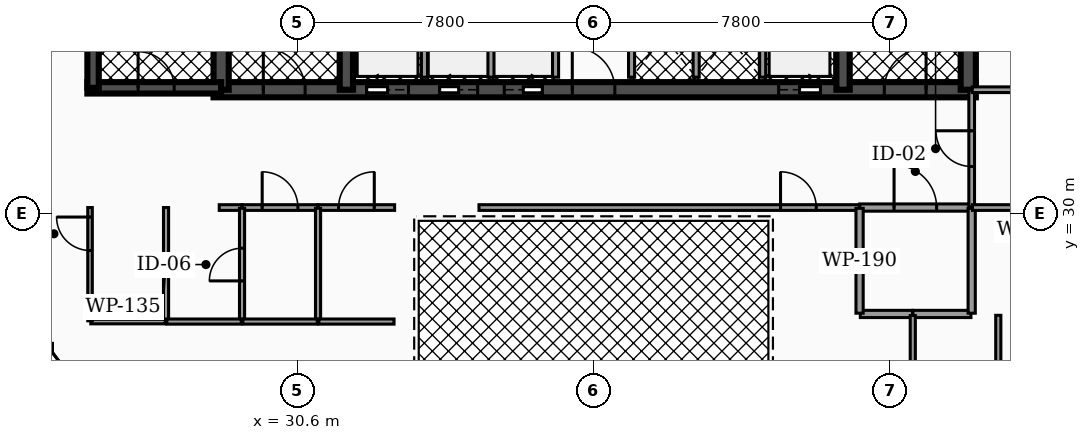
"""IFC4 building model, lengths in metres.
Left out: names, types, materials, properties, quantities, classifications, styles, units other than length and angle.
Written with IfcOpenShell. Run it as: python <this file> out.ifc"""

import sys

from ifc_helpers import new_model, si_unit, direction, frame, frame_2d, origin, place, context, subcontext, project, spatial, rectangle, extrude, element, fill, save


model = new_model("IFC4")
c1 = context("Model", 3, precision=1e-05, world=origin(), true_north=direction((0.0, 1.0)))
c2 = subcontext(c1, "Body", "Model", "MODEL_VIEW")
j1 = project(units=[si_unit("LENGTHUNIT", "METRE"), si_unit("PLANEANGLEUNIT", "RADIAN")], contexts=[c1])
p1 = place(None, origin())
s1 = spatial("IfcSite", under=j1, at=p1, CompositionType="ELEMENT")
p2 = place(p1, origin())
s2 = spatial("IfcBuilding", under=s1, at=p2, CompositionType="ELEMENT")
p3 = place(p2, frame((0.0, 0.0, 168.3)))
s3 = spatial("IfcBuildingStorey", under=s2, at=p3, CompositionType="ELEMENT", Elevation=168.3)
p4 = place(p3, frame((28.4, 33.25, 0.0), z_axis=(0.0, 0.0, 1.0), x_axis=(1.0, 0.0, 0.0)))
e1 = element("IfcWall", 1, at=p4, inside=s3, PredefinedType="SHEAR", context=c2, shape_type="SweptSolid", body=[
    extrude(rectangle(XDim=20.06, YDim=0.4, at=frame_2d((10.03, 0.0))), origin(), (0.0, 0.0, 1.0), 3.5),
])
p5 = place(p4, frame((4.03, 0.0, 0.0)))
e2 = element("IfcOpeningElement", 2, at=p5, cuts=e1, PredefinedType="OPENING", context=c2, shape_type="SweptSolid", body=[
    extrude(rectangle(XDim=1.1, YDim=2.15, at=frame_2d((0.55, 1.075))), frame((0.0, 0.21, 0.0), z_axis=(0.0, -1.0, 0.0), x_axis=(1.0, 0.0, 0.0)), (0.0, 0.0, 1.0), 0.42),
])
p6 = place(p4, frame((14.87, 0.0, 0.0)))
e3 = element("IfcOpeningElement", 3, at=p6, cuts=e1, PredefinedType="OPENING", context=c2, shape_type="SweptSolid", body=[
    extrude(rectangle(XDim=1.1, YDim=2.15, at=frame_2d((0.55, 1.075))), frame((0.0, 0.21, 0.0), z_axis=(0.0, -1.0, 0.0), x_axis=(1.0, 0.0, 0.0)), (0.0, 0.0, 1.0), 0.42),
])
p7 = place(p4, frame((5.95, 0.0, 0.0)))
e4 = element("IfcOpeningElement", 4, at=p7, cuts=e1, PredefinedType="OPENING", context=c2, shape_type="SweptSolid", body=[
    extrude(rectangle(XDim=1.0, YDim=2.1, at=frame_2d((0.5, 1.05))), frame((0.0, 0.21, 0.0), z_axis=(0.0, -1.0, 0.0), x_axis=(1.0, 0.0, 0.0)), (0.0, 0.0, 1.0), 0.42),
])
p8 = place(p4, frame((7.65, 0.0, 0.0)))
e5 = element("IfcOpeningElement", 5, at=p8, cuts=e1, PredefinedType="OPENING", context=c2, shape_type="SweptSolid", body=[
    extrude(rectangle(XDim=1.0, YDim=2.1, at=frame_2d((0.5, 1.05))), frame((0.0, 0.21, 0.0), z_axis=(0.0, -1.0, 0.0), x_axis=(1.0, 0.0, 0.0)), (0.0, 0.0, 1.0), 0.42),
])
p9 = place(p4, frame((1.31, 0.0, 0.0)))
e6 = element("IfcOpeningElement", 6, at=p9, cuts=e1, PredefinedType="OPENING", context=c2, shape_type="SweptSolid", body=[
    extrude(rectangle(XDim=1.1, YDim=2.2, at=frame_2d((0.55, 1.1))), frame((0.0, 0.21, 0.0), z_axis=(0.0, -1.0, 0.0), x_axis=(1.0, 0.0, 0.0)), (0.0, 0.0, 1.0), 0.42),
])
p10 = place(p4, frame((9.44, 0.0, 0.0)))
e7 = element("IfcOpeningElement", 7, at=p10, cuts=e1, PredefinedType="OPENING", context=c2, shape_type="SweptSolid", body=[
    extrude(rectangle(XDim=1.12, YDim=2.05, at=frame_2d((0.56, 1.025))), frame((0.0, 0.21, 0.0), z_axis=(0.0, -1.0, 0.0), x_axis=(1.0, 0.0, 0.0)), (0.0, 0.0, 1.0), 0.42),
])
p11 = place(p4, frame((17.65, 0.0, 0.0)))
e8 = element("IfcOpeningElement", 8, at=p11, cuts=e1, PredefinedType="OPENING", context=c2, shape_type="SweptSolid", body=[
    extrude(rectangle(XDim=1.1, YDim=2.2, at=frame_2d((0.55, 1.1))), frame((0.0, 0.21, 0.0), z_axis=(0.0, -1.0, 0.0), x_axis=(1.0, 0.0, 0.0)), (0.0, 0.0, 1.0), 0.42),
])
p12 = place(p3, frame((28.6, 33.25, 0.0), z_axis=(0.0, 0.0, 1.0), x_axis=(0.0, 1.0, 0.0)))
e9 = element("IfcWall", 9, at=p12, inside=s3, PredefinedType="SHEAR", context=c2, shape_type="SweptSolid", body=[
    extrude(rectangle(XDim=10.2, YDim=0.4, at=frame_2d((5.1, 0.0))), origin(), (0.0, 0.0, 1.0), 3.5),
])
for number, where, z_axis, x_axis in (
    (10, (31.895, 33.25, 0.0), (0.0, 0.0, 1.0), (0.0, 1.0, 0.0)),
    (11, (44.965, 33.25, 0.0), (0.0, 0.0, 1.0), (0.0, 1.0, 0.0)),
):
    element("IfcWall", number, at=place(p3, frame(where, z_axis=z_axis, x_axis=x_axis)), inside=s3, PredefinedType="SHEAR", context=c2, shape_type="SweptSolid", body=[
        extrude(rectangle(XDim=10.2, YDim=0.35, at=frame_2d((5.1, 0.0))), origin(), (0.0, 0.0, 1.0), 3.5),
    ])
p13 = place(p3, frame((48.26, 33.25, 0.0), z_axis=(0.0, 0.0, 1.0), x_axis=(0.0, 1.0, 0.0)))
e12 = element("IfcWall", 12, at=p13, inside=s3, PredefinedType="SHEAR", context=c2, shape_type="SweptSolid", body=[
    extrude(rectangle(XDim=10.2, YDim=0.4, at=frame_2d((5.1, 0.0))), origin(), (0.0, 0.0, 1.0), 3.5),
])
p14 = place(p3, frame((25.08, 33.3, 0.0), z_axis=(0.0, 0.0, 1.0), x_axis=(1.0, 0.0, 0.0)))
e13 = element("IfcWall", 13, at=p14, inside=s3, PredefinedType="SHEAR", context=c2, shape_type="SweptSolid", body=[
    extrude(rectangle(XDim=3.52, YDim=0.3, at=frame_2d((1.76, 0.0))), origin(), (0.0, 0.0, 1.0), 3.5),
])
p15 = place(p14, frame((1.335, 0.0, 0.0)))
e14 = element("IfcOpeningElement", 14, at=p15, cuts=e13, PredefinedType="OPENING", context=c2, shape_type="SweptSolid", body=[
    extrude(rectangle(XDim=0.95, YDim=2.2, at=frame_2d((0.475, 1.1))), frame((0.0, 0.16, 0.0), z_axis=(0.0, -1.0, 0.0), x_axis=(1.0, 0.0, 0.0)), (0.0, 0.0, 1.0), 0.32),
])
p16 = place(p3, frame((25.23, 33.3, 0.0), z_axis=(0.0, 0.0, 1.0), x_axis=(0.0, 1.0, 0.0)))
e15 = element("IfcWall", 15, at=p16, inside=s3, PredefinedType="SHEAR", context=c2, shape_type="SweptSolid", body=[
    extrude(rectangle(XDim=7.6, YDim=0.3, at=frame_2d((3.8, 0.0))), origin(), (0.0, 0.0, 1.0), 3.5),
])
for number, where, z_axis, x_axis in (
    (16, (33.95, 33.58, 0.0), (0.0, 0.0, 1.0), (0.0, 1.0, 0.0)),
    (17, (42.85, 33.58, 0.0), (0.0, 0.0, 1.0), (0.0, 1.0, 0.0)),
):
    element("IfcWall", number, at=place(p3, frame(where, z_axis=z_axis, x_axis=x_axis)), inside=s3, PredefinedType="SOLIDWALL", context=c2, shape_type="SweptSolid", body=[
        extrude(rectangle(XDim=2.45, YDim=0.16, at=frame_2d((1.225, 0.0))), origin(), (0.0, 0.0, 1.0), 2.472),
    ])
for number, where, z_axis, x_axis in (
    (18, (35.7, 33.58, 0.0), (0.0, 0.0, 1.0), (0.0, 1.0, 0.0)),
    (19, (37.4, 33.58, 0.0), (0.0, 0.0, 1.0), (0.0, 1.0, 0.0)),
    (20, (39.4, 33.58, 0.0), (0.0, 0.0, 1.0), (0.0, 1.0, 0.0)),
    (21, (41.1, 33.58, 0.0), (0.0, 0.0, 1.0), (0.0, 1.0, 0.0)),
):
    element("IfcWall", number, at=place(p3, frame(where, z_axis=z_axis, x_axis=x_axis)), inside=s3, PredefinedType="SOLIDWALL", context=c2, shape_type="SweptSolid", body=[
        extrude(rectangle(XDim=2.25, YDim=0.16, at=frame_2d((1.125, 0.0))), origin(), (0.0, 0.0, 1.0), 2.472),
    ])
p17 = place(p3, frame((45.405, 30.15, 0.0), z_axis=(0.0, 0.0, 1.0), x_axis=(1.0, 0.0, 0.0)))
e22 = element("IfcWall", 22, at=p17, inside=s3, PredefinedType="PARTITIONING", context=c2, shape_type="SweptSolid", body=[
    extrude(rectangle(XDim=2.925, YDim=0.19, at=frame_2d((1.462, 0.0))), origin(), (0.0, 0.0, 1.0), 2.457),
])
p18 = place(p17, frame((0.903, 0.0, 0.0)))
e23 = element("IfcOpeningElement", 23, at=p18, cuts=e22, PredefinedType="OPENING", context=c2, shape_type="SweptSolid", body=[
    extrude(rectangle(XDim=1.12, YDim=2.05, at=frame_2d((0.56, 1.025))), frame((0.0, 0.105, 0.0), z_axis=(0.0, -1.0, 0.0), x_axis=(1.0, 0.0, 0.0)), (0.0, 0.0, 1.0), 0.21),
])
p19 = place(p3, frame((48.35, 30.17, 0.0), z_axis=(0.0, 0.0, 1.0), x_axis=(0.0, 1.0, 0.0)))
e24 = element("IfcWall", 24, at=p19, inside=s3, PredefinedType="PARTITIONING", context=c2, shape_type="SweptSolid", body=[
    extrude(rectangle(XDim=3.06, YDim=0.15, at=frame_2d((1.53, 0.0))), origin(), (0.0, 0.0, 1.0), 2.457),
])
p20 = place(p19, frame((1.06, 0.0, 0.0)))
e25 = element("IfcOpeningElement", 25, at=p20, cuts=e24, PredefinedType="OPENING", context=c2, shape_type="SweptSolid", body=[
    extrude(rectangle(XDim=0.94, YDim=2.05, at=frame_2d((0.47, 1.025))), frame((0.0, 0.085, 0.0), z_axis=(0.0, -1.0, 0.0), x_axis=(1.0, 0.0, 0.0)), (0.0, 0.0, 1.0), 0.17),
])
p21 = place(p3, frame((28.55, 30.15, 0.0), z_axis=(0.0, 0.0, 1.0), x_axis=(1.0, 0.0, 0.0)))
e26 = element("IfcWall", 26, at=p21, inside=s3, PredefinedType="PARTITIONING", context=c2, shape_type="SweptSolid", body=[
    extrude(rectangle(XDim=0.595, YDim=0.15, at=frame_2d((0.297, 0.0))), origin(), (0.0, 0.0, 1.0), 2.457),
])
p22 = place(p3, frame((29.155, 30.15, 0.0), z_axis=(0.0, 0.0, 1.0), x_axis=(1.0, 0.0, 0.0)))
e27 = element("IfcWall", 27, at=p22, inside=s3, PredefinedType="PARTITIONING", context=c2, shape_type="SweptSolid", body=[
    extrude(rectangle(XDim=1.99, YDim=0.15, at=frame_2d((0.995, 0.0))), origin(), (0.0, 0.0, 1.0), 2.457),
])
p23 = place(p22, frame((0.525, 0.0, 0.0)))
e28 = element("IfcOpeningElement", 28, at=p23, cuts=e27, PredefinedType="OPENING", context=c2, shape_type="SweptSolid", body=[
    extrude(rectangle(XDim=0.94, YDim=2.05, at=frame_2d((0.47, 1.025))), frame((0.0, 0.085, 0.0), z_axis=(0.0, -1.0, 0.0), x_axis=(1.0, 0.0, 0.0)), (0.0, 0.0, 1.0), 0.17),
])
p24 = place(p3, frame((31.155, 30.15, 0.0), z_axis=(0.0, 0.0, 1.0), x_axis=(1.0, 0.0, 0.0)))
e29 = element("IfcWall", 29, at=p24, inside=s3, PredefinedType="PARTITIONING", context=c2, shape_type="SweptSolid", body=[
    extrude(rectangle(XDim=2.01, YDim=0.15, at=frame_2d((1.005, 0.0))), origin(), (0.0, 0.0, 1.0), 2.457),
])
p25 = place(p24, frame((0.535, 0.0, 0.0)))
e30 = element("IfcOpeningElement", 30, at=p25, cuts=e29, PredefinedType="OPENING", context=c2, shape_type="SweptSolid", body=[
    extrude(rectangle(XDim=0.94, YDim=2.05, at=frame_2d((0.47, 1.025))), frame((0.0, 0.085, 0.0), z_axis=(0.0, -1.0, 0.0), x_axis=(1.0, 0.0, 0.0)), (0.0, 0.0, 1.0), 0.17),
])
p26 = place(p3, frame((35.385, 30.15, 0.0), z_axis=(0.0, 0.0, 1.0), x_axis=(1.0, 0.0, 0.0)))
e31 = element("IfcWall", 31, at=p26, inside=s3, PredefinedType="PARTITIONING", context=c2, shape_type="SweptSolid", body=[
    extrude(rectangle(XDim=10.01, YDim=0.15, at=frame_2d((5.005, 0.0))), origin(), (0.0, 0.0, 1.0), 2.457),
])
p27 = place(p26, frame((7.935, 0.0, 0.0)))
e32 = element("IfcOpeningElement", 32, at=p27, cuts=e31, PredefinedType="OPENING", context=c2, shape_type="SweptSolid", body=[
    extrude(rectangle(XDim=0.94, YDim=2.05, at=frame_2d((0.47, 1.025))), frame((0.0, 0.085, 0.0), z_axis=(0.0, -1.0, 0.0), x_axis=(1.0, 0.0, 0.0)), (0.0, 0.0, 1.0), 0.17),
])
p28 = place(p3, frame((45.42, 27.35, 0.0), z_axis=(0.0, 0.0, 1.0), x_axis=(1.0, 0.0, 0.0)))
e33 = element("IfcWall", 33, at=p28, inside=s3, PredefinedType="PARTITIONING", context=c2, shape_type="SweptSolid", body=[
    extrude(rectangle(XDim=1.375, YDim=0.19, at=frame_2d((0.688, 0.0))), origin(), (0.0, 0.0, 1.0), 2.457),
])
p29 = place(p3, frame((45.4, 27.37, 0.0), z_axis=(0.0, 0.0, 1.0), x_axis=(0.0, 1.0, 0.0)))
e34 = element("IfcWall", 34, at=p29, inside=s3, PredefinedType="PARTITIONING", context=c2, shape_type="SweptSolid", body=[
    extrude(rectangle(XDim=2.76, YDim=0.19, at=frame_2d((1.38, 0.0))), origin(), (0.0, 0.0, 1.0), 2.457),
])
p30 = place(p3, frame((46.805, 27.35, 0.0), z_axis=(0.0, 0.0, 1.0), x_axis=(1.0, 0.0, 0.0)))
e35 = element("IfcWall", 35, at=p30, inside=s3, PredefinedType="PARTITIONING", context=c2, shape_type="SweptSolid", body=[
    extrude(rectangle(XDim=1.525, YDim=0.19, at=frame_2d((0.763, 0.0))), origin(), (0.0, 0.0, 1.0), 2.457),
])
p31 = place(p3, frame((48.35, 27.37, 0.0), z_axis=(0.0, 0.0, 1.0), x_axis=(0.0, 1.0, 0.0)))
e36 = element("IfcWall", 36, at=p31, inside=s3, PredefinedType="PARTITIONING", context=c2, shape_type="SweptSolid", body=[
    extrude(rectangle(XDim=2.76, YDim=0.19, at=frame_2d((1.38, 0.0))), origin(), (0.0, 0.0, 1.0), 2.457),
])
p32 = place(p3, frame((48.37, 30.15, 0.0), z_axis=(0.0, 0.0, 1.0), x_axis=(1.0, 0.0, 0.0)))
e37 = element("IfcWall", 37, at=p32, inside=s3, PredefinedType="PARTITIONING", context=c2, shape_type="SweptSolid", body=[
    extrude(rectangle(XDim=3.26, YDim=0.15, at=frame_2d((1.63, 0.0))), origin(), (0.0, 0.0, 1.0), 2.457),
])
p33 = place(p3, frame((48.365, 33.25, 0.0), z_axis=(0.0, 0.0, 1.0), x_axis=(1.0, 0.0, 0.0)))
e38 = element("IfcWall", 38, at=p33, inside=s3, PredefinedType="PARTITIONING", context=c2, shape_type="SweptSolid", body=[
    extrude(rectangle(XDim=3.265, YDim=0.15, at=frame_2d((1.632, 0.0))), origin(), (0.0, 0.0, 1.0), 2.457),
])
p34 = place(p3, frame((27.15, 27.17, 0.0), z_axis=(0.0, 0.0, 1.0), x_axis=(0.0, 1.0, 0.0)))
e39 = element("IfcWall", 39, at=p34, inside=s3, PredefinedType="PARTITIONING", context=c2, shape_type="SweptSolid", body=[
    extrude(rectangle(XDim=2.98, YDim=0.135, at=frame_2d((1.49, 0.0))), origin(), (0.0, 0.0, 1.0), 2.457),
])
p35 = place(p3, frame((25.17, 27.15, 0.0), z_axis=(0.0, 0.0, 1.0), x_axis=(1.0, 0.0, 0.0)))
e40 = element("IfcWall", 40, at=p35, inside=s3, PredefinedType="PARTITIONING", context=c2, shape_type="SweptSolid", body=[
    extrude(rectangle(XDim=1.96, YDim=0.12, at=frame_2d((0.98, 0.0))), origin(), (0.0, 0.0, 1.0), 2.457),
])
p36 = place(p3, frame((25.15, 27.17, 0.0), z_axis=(0.0, 0.0, 1.0), x_axis=(0.0, 1.0, 0.0)))
e41 = element("IfcWall", 41, at=p36, inside=s3, PredefinedType="PARTITIONING", context=c2, shape_type="SweptSolid", body=[
    extrude(rectangle(XDim=2.98, YDim=0.12, at=frame_2d((1.49, 0.0))), origin(), (0.0, 0.0, 1.0), 2.457),
])
p37 = place(p36, frame((1.85, 0.0, 0.0)))
e42 = element("IfcOpeningElement", 42, at=p37, cuts=e41, PredefinedType="OPENING", context=c2, shape_type="SweptSolid", body=[
    extrude(rectangle(XDim=0.88, YDim=2.05, at=frame_2d((0.44, 1.025))), frame((0.0, 0.07, 0.0), z_axis=(0.0, -1.0, 0.0), x_axis=(1.0, 0.0, 0.0)), (0.0, 0.0, 1.0), 0.14),
])
p38 = place(p3, frame((29.15, 27.17, 0.0), z_axis=(0.0, 0.0, 1.0), x_axis=(0.0, 1.0, 0.0)))
e43 = element("IfcWall", 43, at=p38, inside=s3, PredefinedType="PARTITIONING", context=c2, shape_type="SweptSolid", body=[
    extrude(rectangle(XDim=2.96, YDim=0.135, at=frame_2d((1.48, 0.0))), origin(), (0.0, 0.0, 1.0), 2.457),
])
p39 = place(p38, frame((1.05, 0.0, 0.0)))
e44 = element("IfcOpeningElement", 44, at=p39, cuts=e43, PredefinedType="OPENING", context=c2, shape_type="SweptSolid", body=[
    extrude(rectangle(XDim=0.86, YDim=2.05, at=frame_2d((0.43, 1.025))), frame((0.0, 0.077, 0.0), z_axis=(0.0, -1.0, 0.0), x_axis=(1.0, 0.0, 0.0)), (0.0, 0.0, 1.0), 0.155),
])
p40 = place(p3, frame((27.17, 27.15, 0.0), z_axis=(0.0, 0.0, 1.0), x_axis=(1.0, 0.0, 0.0)))
e45 = element("IfcWall", 45, at=p40, inside=s3, PredefinedType="PARTITIONING", context=c2, shape_type="SweptSolid", body=[
    extrude(rectangle(XDim=1.96, YDim=0.135, at=frame_2d((0.98, 0.0))), origin(), (0.0, 0.0, 1.0), 2.457),
])
p41 = place(p3, frame((31.15, 27.17, 0.0), z_axis=(0.0, 0.0, 1.0), x_axis=(0.0, 1.0, 0.0)))
e46 = element("IfcWall", 46, at=p41, inside=s3, PredefinedType="PARTITIONING", context=c2, shape_type="SweptSolid", body=[
    extrude(rectangle(XDim=2.96, YDim=0.135, at=frame_2d((1.48, 0.0))), origin(), (0.0, 0.0, 1.0), 2.457),
])
p42 = place(p3, frame((29.17, 27.15, 0.0), z_axis=(0.0, 0.0, 1.0), x_axis=(1.0, 0.0, 0.0)))
e47 = element("IfcWall", 47, at=p42, inside=s3, PredefinedType="PARTITIONING", context=c2, shape_type="SweptSolid", body=[
    extrude(rectangle(XDim=1.96, YDim=0.135, at=frame_2d((0.98, 0.0))), origin(), (0.0, 0.0, 1.0), 2.457),
])
p43 = place(p3, frame((31.17, 27.15, 0.0), z_axis=(0.0, 0.0, 1.0), x_axis=(1.0, 0.0, 0.0)))
e48 = element("IfcWall", 48, at=p43, inside=s3, PredefinedType="PARTITIONING", context=c2, shape_type="SweptSolid", body=[
    extrude(rectangle(XDim=1.98, YDim=0.135, at=frame_2d((0.99, 0.0))), origin(), (0.0, 0.0, 1.0), 2.457),
])
p44 = place(p3, frame((46.8, 25.169, 0.0), z_axis=(0.0, 0.0, 1.0), x_axis=(0.0, 1.0, 0.0)))
e49 = element("IfcWall", 49, at=p44, inside=s3, PredefinedType="PARTITIONING", context=c2, shape_type="SweptSolid", body=[
    extrude(rectangle(XDim=2.14, YDim=0.135, at=frame_2d((1.07, 0.0))), origin(), (0.0, 0.0, 1.0), 2.457),
])
p45 = place(p3, frame((49.05, 25.184, 0.0), z_axis=(0.0, 0.0, 1.0), x_axis=(0.0, 1.0, 0.0)))
e50 = element("IfcWall", 50, at=p45, inside=s3, PredefinedType="PARTITIONING", context=c2, shape_type="SweptSolid", body=[
    extrude(rectangle(XDim=2.13, YDim=0.135, at=frame_2d((1.065, 0.0))), origin(), (0.0, 0.0, 1.0), 2.457),
])
p46 = place(p5, origin())
e51 = element("IfcDoor", 51, at=p46, inside=s3, OperationType="SLIDING_TO_LEFT", PredefinedType="DOOR", context=c2, shape_type="SweptSolid", body=[
    extrude(rectangle(XDim=1.1, YDim=2.15, at=frame_2d((0.55, 1.075))), frame((0.0, 0.025, 0.0), z_axis=(0.0, -1.0, 0.0), x_axis=(1.0, 0.0, 0.0)), (0.0, 0.0, 1.0), 0.05),
])
fill(e2, e51)
p47 = place(p6, origin())
e52 = element("IfcDoor", 52, at=p47, inside=s3, OperationType="SLIDING_TO_RIGHT", PredefinedType="DOOR", context=c2, shape_type="SweptSolid", body=[
    extrude(rectangle(XDim=1.1, YDim=2.15, at=frame_2d((0.55, 1.075))), frame((0.0, 0.025, 0.0), z_axis=(0.0, -1.0, 0.0), x_axis=(1.0, 0.0, 0.0)), (0.0, 0.0, 1.0), 0.05),
])
fill(e3, e52)
p48 = place(p7, origin())
e53 = element("IfcDoor", 53, at=p48, inside=s3, OperationType="SLIDING_TO_LEFT", PredefinedType="DOOR", context=c2, shape_type="SweptSolid", body=[
    extrude(rectangle(XDim=1.0, YDim=2.1, at=frame_2d((0.5, 1.05))), frame((0.0, 0.025, 0.0), z_axis=(0.0, -1.0, 0.0), x_axis=(1.0, 0.0, 0.0)), (0.0, 0.0, 1.0), 0.05),
])
fill(e4, e53)
p49 = place(p8, origin())
e54 = element("IfcDoor", 54, at=p49, inside=s3, OperationType="SLIDING_TO_RIGHT", PredefinedType="DOOR", context=c2, shape_type="SweptSolid", body=[
    extrude(rectangle(XDim=1.0, YDim=2.1, at=frame_2d((0.5, 1.05))), frame((0.0, 0.025, 0.0), z_axis=(0.0, -1.0, 0.0), x_axis=(1.0, 0.0, 0.0)), (0.0, 0.0, 1.0), 0.05),
])
fill(e5, e54)
p50 = place(p9, origin())
e55 = element("IfcDoor", 55, at=p50, inside=s3, OperationType="SINGLE_SWING_LEFT", PredefinedType="DOOR", context=c2, shape_type="SweptSolid", body=[
    extrude(rectangle(XDim=1.1, YDim=2.2, at=frame_2d((0.55, 1.1))), frame((0.0, 0.025, 0.0), z_axis=(0.0, -1.0, 0.0), x_axis=(1.0, 0.0, 0.0)), (0.0, 0.0, 1.0), 0.05),
])
fill(e6, e55)
p51 = place(p10, origin())
e56 = element("IfcDoor", 56, at=p51, inside=s3, OperationType="SINGLE_SWING_LEFT", PredefinedType="DOOR", context=c2, shape_type="SweptSolid", body=[
    extrude(rectangle(XDim=1.12, YDim=2.05, at=frame_2d((0.56, 1.025))), frame((0.0, 0.025, 0.0), z_axis=(0.0, -1.0, 0.0), x_axis=(1.0, 0.0, 0.0)), (0.0, 0.0, 1.0), 0.05),
])
fill(e7, e56)
p52 = place(p11, origin())
e57 = element("IfcDoor", 57, at=p52, inside=s3, OperationType="SINGLE_SWING_RIGHT", PredefinedType="DOOR", context=c2, shape_type="SweptSolid", body=[
    extrude(rectangle(XDim=1.1, YDim=2.2, at=frame_2d((0.55, 1.1))), frame((0.0, 0.025, 0.0), z_axis=(0.0, -1.0, 0.0), x_axis=(1.0, 0.0, 0.0)), (0.0, 0.0, 1.0), 0.05),
])
fill(e8, e57)
p53 = place(p15, origin())
e58 = element("IfcDoor", 58, at=p53, inside=s3, OperationType="SINGLE_SWING_LEFT", PredefinedType="DOOR", context=c2, shape_type="SweptSolid", body=[
    extrude(rectangle(XDim=0.95, YDim=2.2, at=frame_2d((0.475, 1.1))), frame((0.0, 0.025, 0.0), z_axis=(0.0, -1.0, 0.0), x_axis=(1.0, 0.0, 0.0)), (0.0, 0.0, 1.0), 0.05),
])
fill(e14, e58)
p54 = place(p18, origin())
e59 = element("IfcDoor", 59, at=p54, inside=s3, OperationType="SINGLE_SWING_LEFT", PredefinedType="DOOR", context=c2, shape_type="SweptSolid", body=[
    extrude(rectangle(XDim=1.12, YDim=2.05, at=frame_2d((0.56, 1.025))), frame((0.0, 0.025, 0.0), z_axis=(0.0, -1.0, 0.0), x_axis=(1.0, 0.0, 0.0)), (0.0, 0.0, 1.0), 0.05),
])
fill(e23, e59)
p55 = place(p20, origin())
e60 = element("IfcDoor", 60, at=p55, inside=s3, OperationType="SINGLE_SWING_RIGHT", PredefinedType="DOOR", context=c2, shape_type="SweptSolid", body=[
    extrude(rectangle(XDim=0.94, YDim=2.05, at=frame_2d((0.47, 1.025))), frame((0.0, 0.025, 0.0), z_axis=(0.0, -1.0, 0.0), x_axis=(1.0, 0.0, 0.0)), (0.0, 0.0, 1.0), 0.05),
])
fill(e25, e60)
p56 = place(p23, origin())
e61 = element("IfcDoor", 61, at=p56, inside=s3, OperationType="SINGLE_SWING_LEFT", PredefinedType="DOOR", context=c2, shape_type="SweptSolid", body=[
    extrude(rectangle(XDim=0.94, YDim=2.05, at=frame_2d((0.47, 1.025))), frame((0.0, 0.025, 0.0), z_axis=(0.0, -1.0, 0.0), x_axis=(1.0, 0.0, 0.0)), (0.0, 0.0, 1.0), 0.05),
])
fill(e28, e61)
p57 = place(p25, origin())
e62 = element("IfcDoor", 62, at=p57, inside=s3, OperationType="SINGLE_SWING_RIGHT", PredefinedType="DOOR", context=c2, shape_type="SweptSolid", body=[
    extrude(rectangle(XDim=0.94, YDim=2.05, at=frame_2d((0.47, 1.025))), frame((0.0, 0.025, 0.0), z_axis=(0.0, -1.0, 0.0), x_axis=(1.0, 0.0, 0.0)), (0.0, 0.0, 1.0), 0.05),
])
fill(e30, e62)
p58 = place(p27, origin())
e63 = element("IfcDoor", 63, at=p58, inside=s3, OperationType="SINGLE_SWING_LEFT", PredefinedType="DOOR", context=c2, shape_type="SweptSolid", body=[
    extrude(rectangle(XDim=0.94, YDim=2.05, at=frame_2d((0.47, 1.025))), frame((0.0, 0.025, 0.0), z_axis=(0.0, -1.0, 0.0), x_axis=(1.0, 0.0, 0.0)), (0.0, 0.0, 1.0), 0.05),
])
fill(e32, e63)
p59 = place(p37, origin())
e64 = element("IfcDoor", 64, at=p59, inside=s3, OperationType="SINGLE_SWING_RIGHT", PredefinedType="DOOR", context=c2, shape_type="SweptSolid", body=[
    extrude(rectangle(XDim=0.88, YDim=2.05, at=frame_2d((0.44, 1.025))), frame((0.0, 0.025, 0.0), z_axis=(0.0, -1.0, 0.0), x_axis=(1.0, 0.0, 0.0)), (0.0, 0.0, 1.0), 0.05),
])
fill(e42, e64)
p60 = place(p39, origin())
e65 = element("IfcDoor", 65, at=p60, inside=s3, OperationType="SINGLE_SWING_LEFT", PredefinedType="DOOR", context=c2, shape_type="SweptSolid", body=[
    extrude(rectangle(XDim=0.86, YDim=2.05, at=frame_2d((0.43, 1.025))), frame((0.0, 0.025, 0.0), z_axis=(0.0, -1.0, 0.0), x_axis=(1.0, 0.0, 0.0)), (0.0, 0.0, 1.0), 0.05),
])
fill(e44, e65)
save(model, sys.argv[1])
